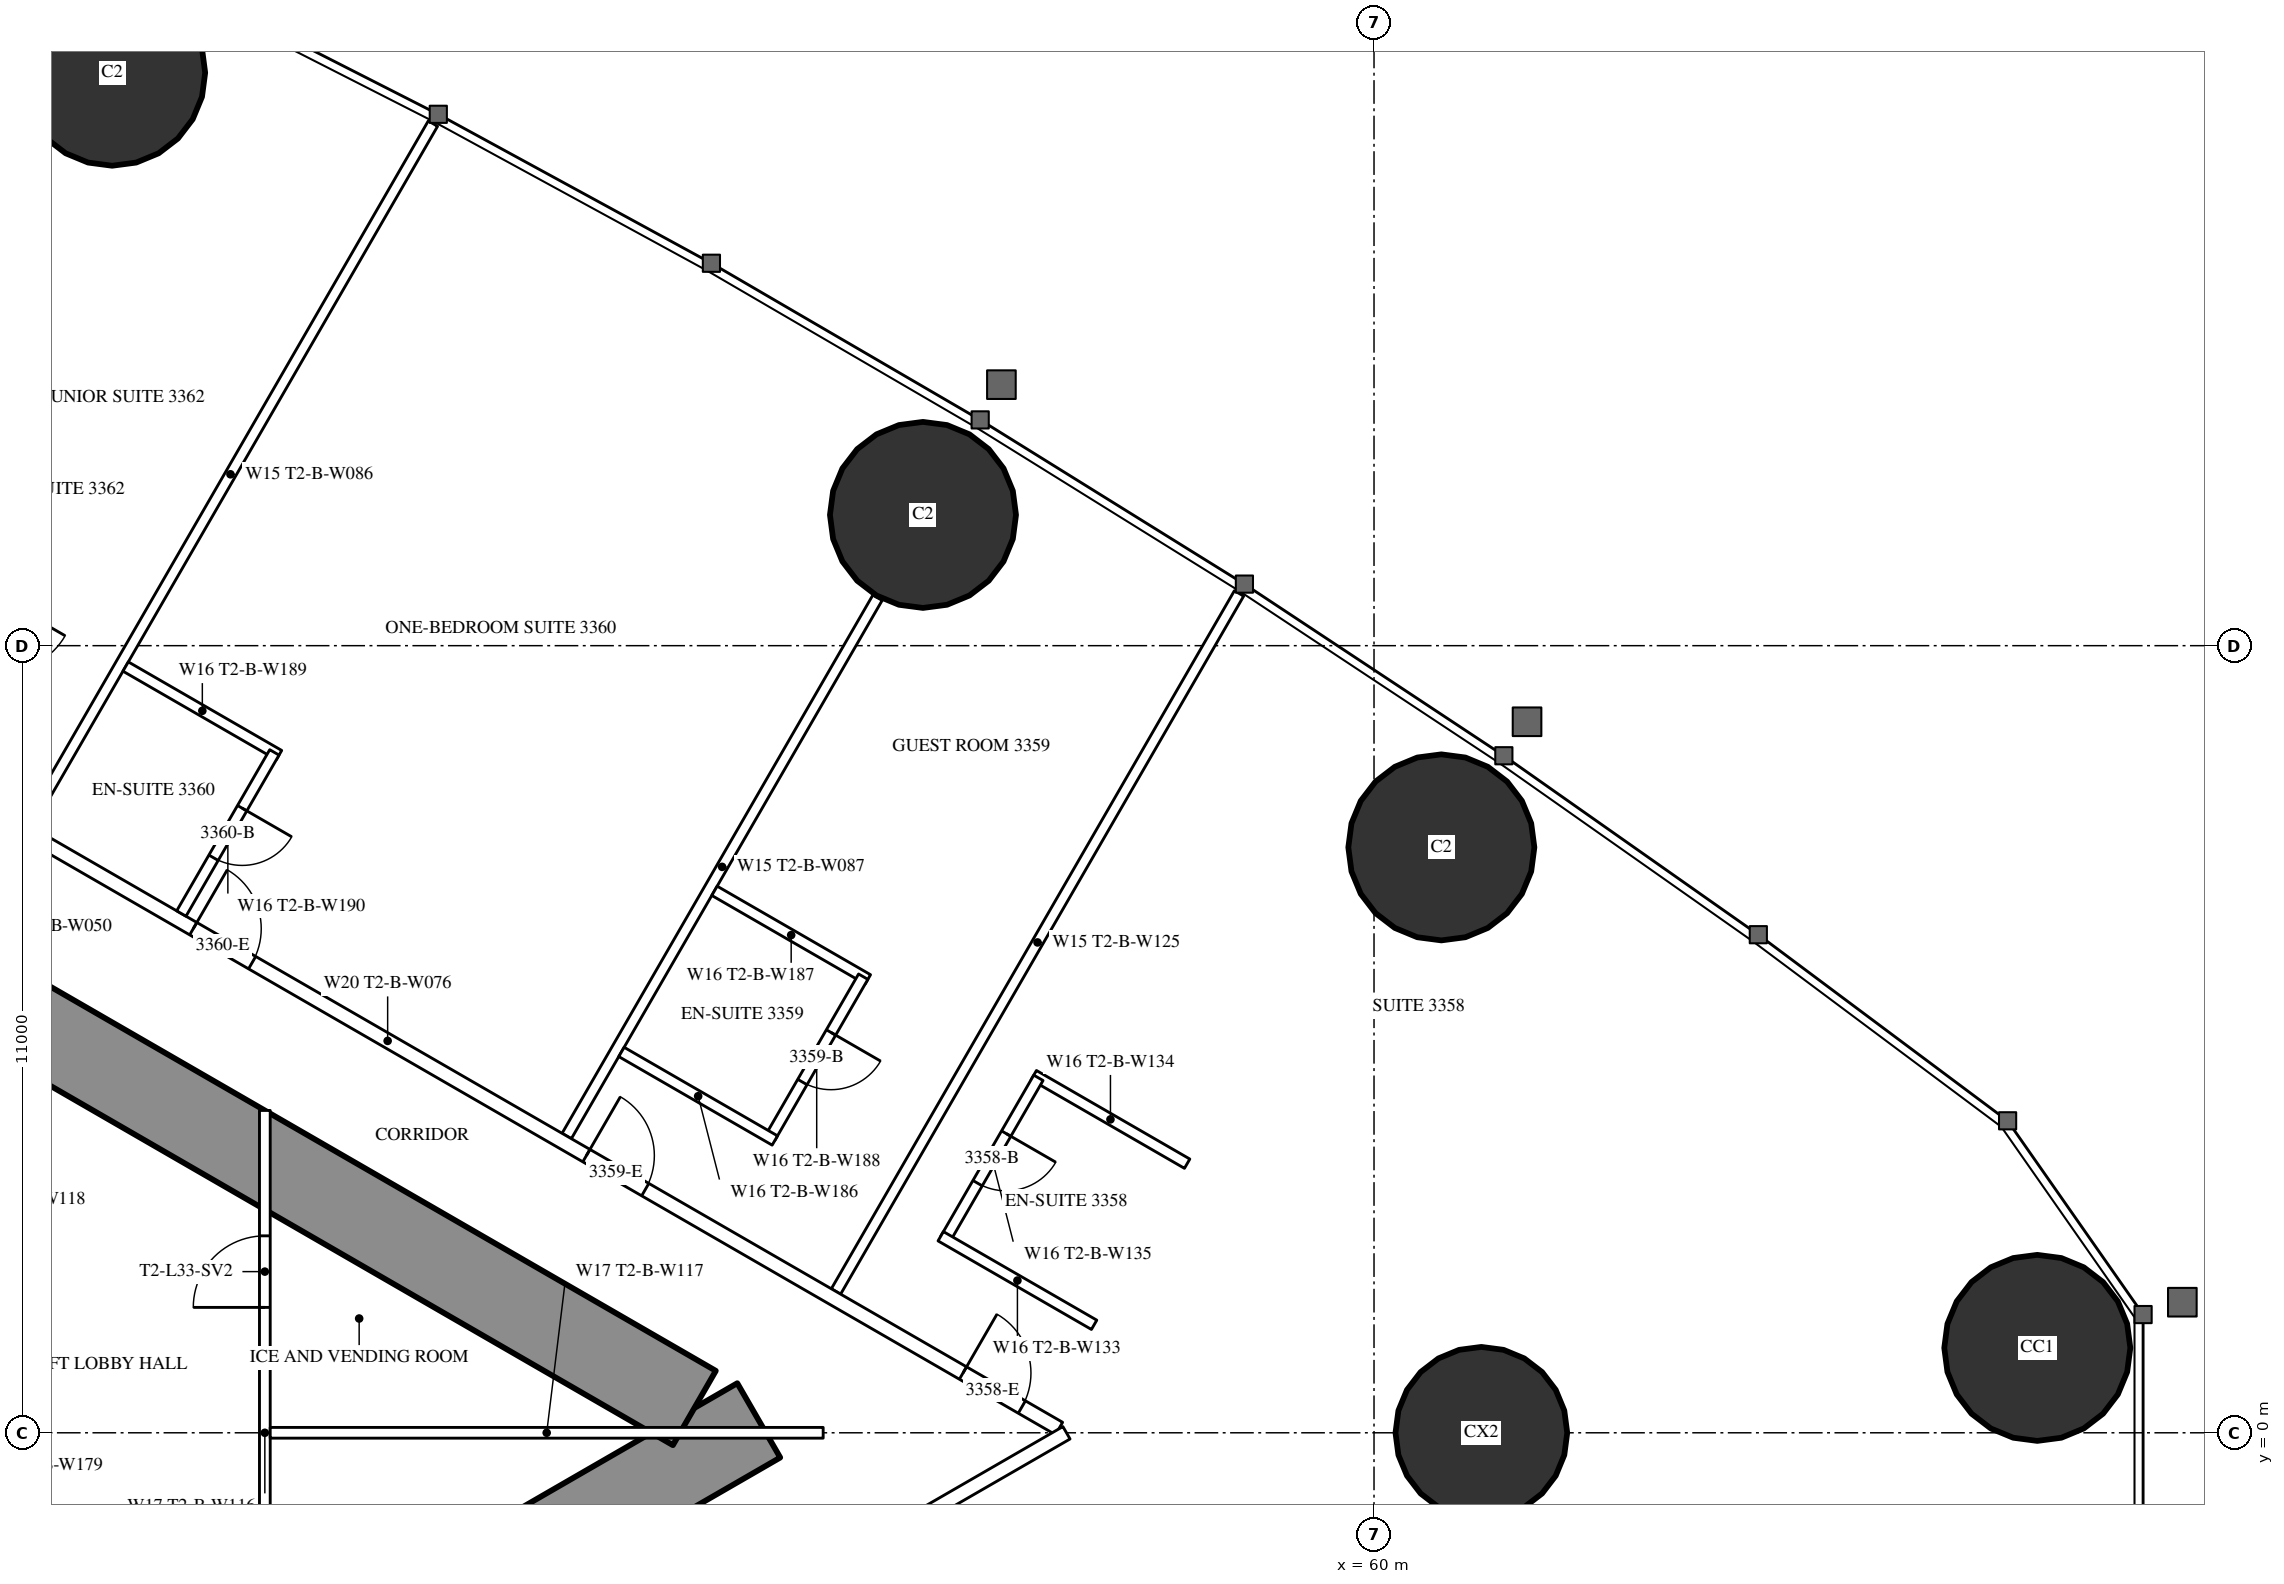
"""IFC4 building model, lengths in metres.
Left out: names, types, materials, properties, quantities, classifications, styles, units other than length and angle.
Written with IfcOpenShell. Run it as: python <this file> out.ifc"""

import sys

from ifc_helpers import new_model, si_unit, direction, frame, frame_2d, origin, origin_2d, place, context, subcontext, project, spatial, rectangle, circle, hollow_circle, extrude, element, fill, save


model = new_model("IFC4")
c1 = context("Model", 3, precision=1e-05, world=origin(), true_north=direction((0.0, 1.0)))
c2 = subcontext(c1, "Body", "Model", "MODEL_VIEW")
j1 = project(units=[si_unit("LENGTHUNIT", "METRE"), si_unit("PLANEANGLEUNIT", "RADIAN")], contexts=[c1])
p1 = place(None, origin())
s1 = spatial("IfcSite", under=j1, at=p1, CompositionType="ELEMENT")
p2 = place(p1, origin())
s2 = spatial("IfcBuilding", under=s1, at=p2, CompositionType="ELEMENT")
p3 = place(p2, frame((0.0, 0.0, 125.6)))
s3 = spatial("IfcBuildingStorey", under=s2, at=p3, CompositionType="ELEMENT", Elevation=125.6)
for number, where, z_axis, x_axis in (
    (1, (69.269, 1.187, 0.0), (0.0, 0.0, 1.0), (1.0, 0.0, 0.0)),
    (2, (60.941, 8.181, 0.0), (0.0, 0.0, 1.0), (1.0, 0.0, 0.0)),
    (3, (53.697, 12.827, 0.0), (0.0, 0.0, 1.0), (1.0, 0.0, 0.0)),
    (4, (42.366, 19.007, 0.0), (0.0, 0.0, 1.0), (1.0, 0.0, 0.0)),
):
    element("IfcColumn", number, at=place(p3, frame(where, z_axis=z_axis, x_axis=x_axis)), inside=s3, PredefinedType="COLUMN", context=c2, shape_type="SweptSolid", body=[
        extrude(hollow_circle(Radius=1.3, WallThickness=0.1, at=origin_2d()), origin(), (0.0, 0.0, 1.0), 3.5),
    ])
p4 = place(p3, frame((61.5, 0.0, 0.0), z_axis=(0.0, 0.0, 1.0), x_axis=(1.0, 0.0, 0.0)))
e5 = element("IfcColumn", 5, at=p4, inside=s3, PredefinedType="COLUMN", context=c2, shape_type="SweptSolid", body=[
    extrude(circle(Radius=1.2, at=origin_2d()), origin(), (0.0, 0.0, 1.0), 3.5),
])
p5 = place(p3, frame((27.2, -13.8, 0.0), z_axis=(0.0, 0.0, 1.0), x_axis=(0.866027159892, 0.499996958321, 0.0)))
e6 = element("IfcWall", 6, at=p5, inside=s3, PredefinedType="SHEAR", context=c2, shape_type="SweptSolid", body=[
    extrude(rectangle(XDim=27.947, YDim=1.2, at=frame_2d((13.973, 0.0))), origin(), (0.0, 0.0, 1.0), 3.5),
])
p6 = place(p5, frame((4.6, 0.0, 0.0)))
e7 = element("IfcOpeningElement", 7, at=p6, cuts=e6, PredefinedType="OPENING", context=c2, shape_type="SweptSolid", body=[
    extrude(rectangle(XDim=1.0, YDim=2.2, at=frame_2d((0.5, 1.1))), frame((0.0, 0.61, 0.0), z_axis=(0.0, -1.0, 0.0), x_axis=(1.0, 0.0, 0.0)), (0.0, 0.0, 1.0), 1.22),
])
p7 = place(p5, frame((13.395, 0.0, 0.0)))
e8 = element("IfcOpeningElement", 8, at=p7, cuts=e6, PredefinedType="OPENING", context=c2, shape_type="SweptSolid", body=[
    extrude(rectangle(XDim=1.8, YDim=2.2, at=frame_2d((0.9, 1.1))), frame((0.0, 0.61, 0.0), z_axis=(0.0, -1.0, 0.0), x_axis=(1.0, 0.0, 0.0)), (0.0, 0.0, 1.0), 1.22),
])
p8 = place(p3, frame((27.2, 13.8, 0.0), z_axis=(0.0, 0.0, 1.0), x_axis=(0.866024515034, -0.500001539357, 0.0)))
e9 = element("IfcWall", 9, at=p8, inside=s3, PredefinedType="SHEAR", context=c2, shape_type="SweptSolid", body=[
    extrude(rectangle(XDim=26.907, YDim=1.2, at=frame_2d((13.454, 0.0))), origin(), (0.0, 0.0, 1.0), 3.5),
])
p9 = place(p8, frame((4.6, 0.0, 0.0)))
e10 = element("IfcOpeningElement", 10, at=p9, cuts=e9, PredefinedType="OPENING", context=c2, shape_type="SweptSolid", body=[
    extrude(rectangle(XDim=1.0, YDim=2.2, at=frame_2d((0.5, 1.1))), frame((0.0, 0.61, 0.0), z_axis=(0.0, -1.0, 0.0), x_axis=(1.0, 0.0, 0.0)), (0.0, 0.0, 1.0), 1.22),
])
p10 = place(p8, frame((13.395, 0.0, 0.0)))
e11 = element("IfcOpeningElement", 11, at=p10, cuts=e9, PredefinedType="OPENING", context=c2, shape_type="SweptSolid", body=[
    extrude(rectangle(XDim=1.8, YDim=2.2, at=frame_2d((0.9, 1.1))), frame((0.0, 0.61, 0.0), z_axis=(0.0, -1.0, 0.0), x_axis=(1.0, 0.0, 0.0)), (0.0, 0.0, 1.0), 1.22),
])
p11 = place(p3, frame((41.19, 8.494, 0.0), z_axis=(0.0, 0.0, 1.0), x_axis=(0.49999258054, 0.866029687369, 0.0)))
e12 = element("IfcWall", 12, at=p11, inside=s3, PredefinedType="PARTITIONING", context=c2, shape_type="SweptSolid", body=[
    extrude(rectangle(XDim=11.318, YDim=0.15, at=frame_2d((5.659, 0.0))), origin(), (0.0, 0.0, 1.0), 3.25),
])
p12 = place(p3, frame((48.719, 4.147, 0.0), z_axis=(0.0, 0.0, 1.0), x_axis=(0.499993328235, 0.866029255696, 0.0)))
e13 = element("IfcWall", 13, at=p12, inside=s3, PredefinedType="PARTITIONING", context=c2, shape_type="SweptSolid", body=[
    extrude(rectangle(XDim=8.686, YDim=0.15, at=frame_2d((4.343, 0.0))), origin(), (0.0, 0.0, 1.0), 2.2),
])
p13 = place(p3, frame((52.481, 1.975, 0.0), z_axis=(0.0, 0.0, 1.0), x_axis=(0.500003867771, 0.866023170714, 0.0)))
e14 = element("IfcWall", 14, at=p13, inside=s3, PredefinedType="PARTITIONING", context=c2, shape_type="SweptSolid", body=[
    extrude(rectangle(XDim=11.265, YDim=0.15, at=frame_2d((5.632, 0.0))), origin(), (0.0, 0.0, 1.0), 3.25),
])
p14 = place(p3, frame((36.834, 10.894, 0.0), z_axis=(0.0, 0.0, 1.0), x_axis=(0.866028157229, -0.499995230863, 0.0)))
e15 = element("IfcWall", 15, at=p14, inside=s3, PredefinedType="PARTITIONING", context=c2, shape_type="SweptSolid", body=[
    extrude(rectangle(XDim=21.667, YDim=0.2, at=frame_2d((10.833, 0.0))), origin(), (0.0, 0.0, 1.0), 3.25),
])
p15 = place(p14, frame((20.117, 0.0, 0.0)))
e16 = element("IfcOpeningElement", 16, at=p15, cuts=e15, PredefinedType="OPENING", context=c2, shape_type="SweptSolid", body=[
    extrude(rectangle(XDim=0.95, YDim=2.2, at=frame_2d((0.475, 1.1))), frame((0.0, 0.11, 0.0), z_axis=(0.0, -1.0, 0.0), x_axis=(1.0, 0.0, 0.0)), (0.0, 0.0, 1.0), 0.22),
])
p16 = place(p14, frame((14.04, 0.0, 0.0)))
e17 = element("IfcOpeningElement", 17, at=p16, cuts=e15, PredefinedType="OPENING", context=c2, shape_type="SweptSolid", body=[
    extrude(rectangle(XDim=0.95, YDim=2.2, at=frame_2d((0.475, 1.1))), frame((0.0, 0.11, 0.0), z_axis=(0.0, -1.0, 0.0), x_axis=(1.0, 0.0, 0.0)), (0.0, 0.0, 1.0), 0.22),
])
p17 = place(p14, frame((7.697, 0.0, 0.0)))
e18 = element("IfcOpeningElement", 18, at=p17, cuts=e15, PredefinedType="OPENING", context=c2, shape_type="SweptSolid", body=[
    extrude(rectangle(XDim=0.95, YDim=2.2, at=frame_2d((0.475, 1.1))), frame((0.0, 0.11, 0.0), z_axis=(0.0, -1.0, 0.0), x_axis=(1.0, 0.0, 0.0)), (0.0, 0.0, 1.0), 0.22),
])
p18 = place(p14, frame((3.35, 0.0, 0.0)))
e19 = element("IfcOpeningElement", 19, at=p18, cuts=e15, PredefinedType="OPENING", context=c2, shape_type="SweptSolid", body=[
    extrude(rectangle(XDim=1.0, YDim=2.2, at=frame_2d((0.5, 1.1))), frame((0.0, 0.11, 0.0), z_axis=(0.0, -1.0, 0.0), x_axis=(1.0, 0.0, 0.0)), (0.0, 0.0, 1.0), 0.22),
])
p19 = place(p3, frame((44.925, -6.222, 0.0), z_axis=(0.0, 0.0, 1.0), x_axis=(0.866020269055, 0.500008893506, 0.0)))
e20 = element("IfcWall", 20, at=p19, inside=s3, PredefinedType="PARTITIONING", context=c2, shape_type="SweptSolid", body=[
    extrude(rectangle(XDim=12.444, YDim=0.2, at=frame_2d((6.222, 0.0))), origin(), (0.0, 0.0, 1.0), 3.25),
])
p20 = place(p19, frame((0.6, 0.0, 0.0)))
e21 = element("IfcOpeningElement", 21, at=p20, cuts=e20, PredefinedType="OPENING", context=c2, shape_type="SweptSolid", body=[
    extrude(rectangle(XDim=0.95, YDim=2.2, at=frame_2d((0.475, 1.1))), frame((0.0, 0.11, 0.0), z_axis=(0.0, -1.0, 0.0), x_axis=(1.0, 0.0, 0.0)), (0.0, 0.0, 1.0), 0.22),
])
p21 = place(p19, frame((7.047, 0.0, 0.0)))
e22 = element("IfcOpeningElement", 22, at=p21, cuts=e20, PredefinedType="OPENING", context=c2, shape_type="SweptSolid", body=[
    extrude(rectangle(XDim=0.95, YDim=2.2, at=frame_2d((0.475, 1.1))), frame((0.0, 0.11, 0.0), z_axis=(0.0, -1.0, 0.0), x_axis=(1.0, 0.0, 0.0)), (0.0, 0.0, 1.0), 0.22),
])
p22 = place(p3, frame((55.245, 4.998, 0.0), z_axis=(0.0, 0.0, 1.0), x_axis=(0.866006523861, -0.500032699561, 0.0)))
e23 = element("IfcWall", 23, at=p22, inside=s3, PredefinedType="PARTITIONING", context=c2, shape_type="SweptSolid", body=[
    extrude(rectangle(XDim=2.475, YDim=0.15, at=frame_2d((1.237, 0.0))), origin(), (0.0, 0.0, 1.0), 3.25),
])
p23 = place(p3, frame((54.01, 2.709, 0.0), z_axis=(0.0, 0.0, 1.0), x_axis=(0.500006934395, 0.866021400173, 0.0)))
e24 = element("IfcWall", 24, at=p23, inside=s3, PredefinedType="PARTITIONING", context=c2, shape_type="SweptSolid", body=[
    extrude(rectangle(XDim=2.6, YDim=0.15, at=frame_2d((1.3, 0.0))), origin(), (0.0, 0.0, 1.0), 3.25),
])
p24 = place(p23, frame((0.9, 0.0, 0.0)))
e25 = element("IfcOpeningElement", 25, at=p24, cuts=e24, PredefinedType="OPENING", context=c2, shape_type="SweptSolid", body=[
    extrude(rectangle(XDim=0.8, YDim=2.2, at=frame_2d((0.4, 1.1))), frame((0.0, 0.085, 0.0), z_axis=(0.0, -1.0, 0.0), x_axis=(1.0, 0.0, 0.0)), (0.0, 0.0, 1.0), 0.17),
])
p25 = place(p3, frame((53.945, 2.747, 0.0), z_axis=(0.0, 0.0, 1.0), x_axis=(0.866031185235, -0.4999899861, 0.0)))
e26 = element("IfcWall", 26, at=p25, inside=s3, PredefinedType="PARTITIONING", context=c2, shape_type="SweptSolid", body=[
    extrude(rectangle(XDim=2.475, YDim=0.15, at=frame_2d((1.238, 0.0))), origin(), (0.0, 0.0, 1.0), 3.25),
])
p26 = place(p3, frame((50.783, 7.574, 0.0), z_axis=(0.0, 0.0, 1.0), x_axis=(0.866006523861, -0.500032699561, 0.0)))
e27 = element("IfcWall", 27, at=p26, inside=s3, PredefinedType="PARTITIONING", context=c2, shape_type="SweptSolid", body=[
    extrude(rectangle(XDim=2.475, YDim=0.15, at=frame_2d((1.237, 0.0))), origin(), (0.0, 0.0, 1.0), 3.25),
])
p27 = place(p3, frame((51.562, 4.123, 0.0), z_axis=(0.0, 0.0, 1.0), x_axis=(0.49997716683, 0.86603858612, 0.0)))
e28 = element("IfcWall", 28, at=p27, inside=s3, PredefinedType="PARTITIONING", context=c2, shape_type="SweptSolid", body=[
    extrude(rectangle(XDim=2.6, YDim=0.15, at=frame_2d((1.3, 0.0))), origin(), (0.0, 0.0, 1.0), 3.25),
])
p28 = place(p27, frame((0.9, 0.0, 0.0)))
e29 = element("IfcOpeningElement", 29, at=p28, cuts=e28, PredefinedType="OPENING", context=c2, shape_type="SweptSolid", body=[
    extrude(rectangle(XDim=0.8, YDim=2.2, at=frame_2d((0.4, 1.1))), frame((0.0, 0.085, 0.0), z_axis=(0.0, -1.0, 0.0), x_axis=(1.0, 0.0, 0.0)), (0.0, 0.0, 1.0), 0.17),
])
for number, where, z_axis, x_axis in (
    (30, (49.483, 5.323, 0.0), (0.0, 0.0, 1.0), (0.866, -0.5, 0.0)),
    (31, (42.555, 10.708, 0.0), (0.0, 0.0, 1.0), (0.866, -0.5, 0.0)),
):
    element("IfcWall", number, at=place(p3, frame(where, z_axis=z_axis, x_axis=x_axis)), inside=s3, PredefinedType="PARTITIONING", context=c2, shape_type="SweptSolid", body=[
        extrude(rectangle(XDim=2.475, YDim=0.15, at=frame_2d((1.238, 0.0))), origin(), (0.0, 0.0, 1.0), 3.25),
    ])
p29 = place(p3, frame((43.333, 7.257, 0.0), z_axis=(0.0, 0.0, 1.0), x_axis=(0.500006934395, 0.866021400173, 0.0)))
e32 = element("IfcWall", 32, at=p29, inside=s3, PredefinedType="PARTITIONING", context=c2, shape_type="SweptSolid", body=[
    extrude(rectangle(XDim=2.6, YDim=0.15, at=frame_2d((1.3, 0.0))), origin(), (0.0, 0.0, 1.0), 3.25),
])
p30 = place(p29, frame((0.9, 0.0, 0.0)))
e33 = element("IfcOpeningElement", 33, at=p30, cuts=e32, PredefinedType="OPENING", context=c2, shape_type="SweptSolid", body=[
    extrude(rectangle(XDim=0.8, YDim=2.2, at=frame_2d((0.4, 1.1))), frame((0.0, 0.085, 0.0), z_axis=(0.0, -1.0, 0.0), x_axis=(1.0, 0.0, 0.0)), (0.0, 0.0, 1.0), 0.17),
])
p31 = place(p3, frame((44.5, -4.505, 0.0), z_axis=(0.0, 0.0, 1.0), x_axis=(0.0, 1.0, 0.0)))
e34 = element("IfcWall", 34, at=p31, inside=s3, PredefinedType="PARTITIONING", context=c2, shape_type="SweptSolid", body=[
    extrude(rectangle(XDim=9.009, YDim=0.15, at=frame_2d((4.505, 0.0))), origin(), (0.0, 0.0, 1.0), 2.45),
])
p32 = place(p31, frame((1.752, 0.0, 0.0)))
e35 = element("IfcOpeningElement", 35, at=p32, cuts=e34, PredefinedType="OPENING", context=c2, shape_type="SweptSolid", body=[
    extrude(rectangle(XDim=1.0, YDim=2.2, at=frame_2d((0.5, 1.1))), frame((0.0, 0.085, 0.0), z_axis=(0.0, -1.0, 0.0), x_axis=(1.0, 0.0, 0.0)), (0.0, 0.0, 1.0), 0.17),
])
p33 = place(p31, frame((6.257, 0.0, 0.0)))
e36 = element("IfcOpeningElement", 36, at=p33, cuts=e34, PredefinedType="OPENING", context=c2, shape_type="SweptSolid", body=[
    extrude(rectangle(XDim=1.0, YDim=2.2, at=frame_2d((0.5, 1.1))), frame((0.0, 0.085, 0.0), z_axis=(0.0, -1.0, 0.0), x_axis=(1.0, 0.0, 0.0)), (0.0, 0.0, 1.0), 0.17),
])
p34 = place(p3, frame((44.575, 0.0, 0.0), z_axis=(0.0, 0.0, 1.0), x_axis=(1.0, 0.0, 0.0)))
e37 = element("IfcWall", 37, at=p34, inside=s3, PredefinedType="PARTITIONING", context=c2, shape_type="SweptSolid", body=[
    extrude(rectangle(XDim=7.727, YDim=0.15, at=frame_2d((3.864, 0.0))), origin(), (0.0, 0.0, 1.0), 2.2),
])
p35 = place(p24, origin())
e38 = element("IfcDoor", 38, at=p35, inside=s3, OperationType="SINGLE_SWING_RIGHT", PredefinedType="DOOR", context=c2, shape_type="SweptSolid", body=[
    extrude(rectangle(XDim=0.8, YDim=2.2, at=frame_2d((0.4, 1.1))), frame((0.0, 0.025, 0.0), z_axis=(0.0, -1.0, 0.0), x_axis=(1.0, 0.0, 0.0)), (0.0, 0.0, 1.0), 0.05),
])
fill(e25, e38)
p36 = place(p15, origin())
e39 = element("IfcDoor", 39, at=p36, inside=s3, OperationType="SINGLE_SWING_LEFT", PredefinedType="DOOR", context=c2, shape_type="SweptSolid", body=[
    extrude(rectangle(XDim=0.95, YDim=2.2, at=frame_2d((0.475, 1.1))), frame((0.0, 0.025, 0.0), z_axis=(0.0, -1.0, 0.0), x_axis=(1.0, 0.0, 0.0)), (0.0, 0.0, 1.0), 0.05),
])
fill(e16, e39)
p37 = place(p28, origin())
e40 = element("IfcDoor", 40, at=p37, inside=s3, OperationType="SINGLE_SWING_RIGHT", PredefinedType="DOOR", context=c2, shape_type="SweptSolid", body=[
    extrude(rectangle(XDim=0.8, YDim=2.2, at=frame_2d((0.4, 1.1))), frame((0.0, 0.025, 0.0), z_axis=(0.0, -1.0, 0.0), x_axis=(1.0, 0.0, 0.0)), (0.0, 0.0, 1.0), 0.05),
])
fill(e29, e40)
p38 = place(p16, origin())
e41 = element("IfcDoor", 41, at=p38, inside=s3, OperationType="SINGLE_SWING_LEFT", PredefinedType="DOOR", context=c2, shape_type="SweptSolid", body=[
    extrude(rectangle(XDim=0.95, YDim=2.2, at=frame_2d((0.475, 1.1))), frame((0.0, 0.025, 0.0), z_axis=(0.0, -1.0, 0.0), x_axis=(1.0, 0.0, 0.0)), (0.0, 0.0, 1.0), 0.05),
])
fill(e17, e41)
p39 = place(p30, origin())
e42 = element("IfcDoor", 42, at=p39, inside=s3, OperationType="SINGLE_SWING_RIGHT", PredefinedType="DOOR", context=c2, shape_type="SweptSolid", body=[
    extrude(rectangle(XDim=0.8, YDim=2.2, at=frame_2d((0.4, 1.1))), frame((0.0, 0.025, 0.0), z_axis=(0.0, -1.0, 0.0), x_axis=(1.0, 0.0, 0.0)), (0.0, 0.0, 1.0), 0.05),
])
fill(e33, e42)
p40 = place(p17, origin())
e43 = element("IfcDoor", 43, at=p40, inside=s3, OperationType="SINGLE_SWING_LEFT", PredefinedType="DOOR", context=c2, shape_type="SweptSolid", body=[
    extrude(rectangle(XDim=0.95, YDim=2.2, at=frame_2d((0.475, 1.1))), frame((0.0, 0.025, 0.0), z_axis=(0.0, -1.0, 0.0), x_axis=(1.0, 0.0, 0.0)), (0.0, 0.0, 1.0), 0.05),
])
fill(e18, e43)
p41 = place(p33, origin())
e44 = element("IfcDoor", 44, at=p41, inside=s3, OperationType="SINGLE_SWING_LEFT", PredefinedType="DOOR", context=c2, shape_type="SweptSolid", body=[
    extrude(rectangle(XDim=1.0, YDim=2.2, at=frame_2d((0.5, 1.1))), frame((0.0, 0.025, 0.0), z_axis=(0.0, -1.0, 0.0), x_axis=(1.0, 0.0, 0.0)), (0.0, 0.0, 1.0), 0.05),
])
fill(e36, e44)
save(model, sys.argv[1])
